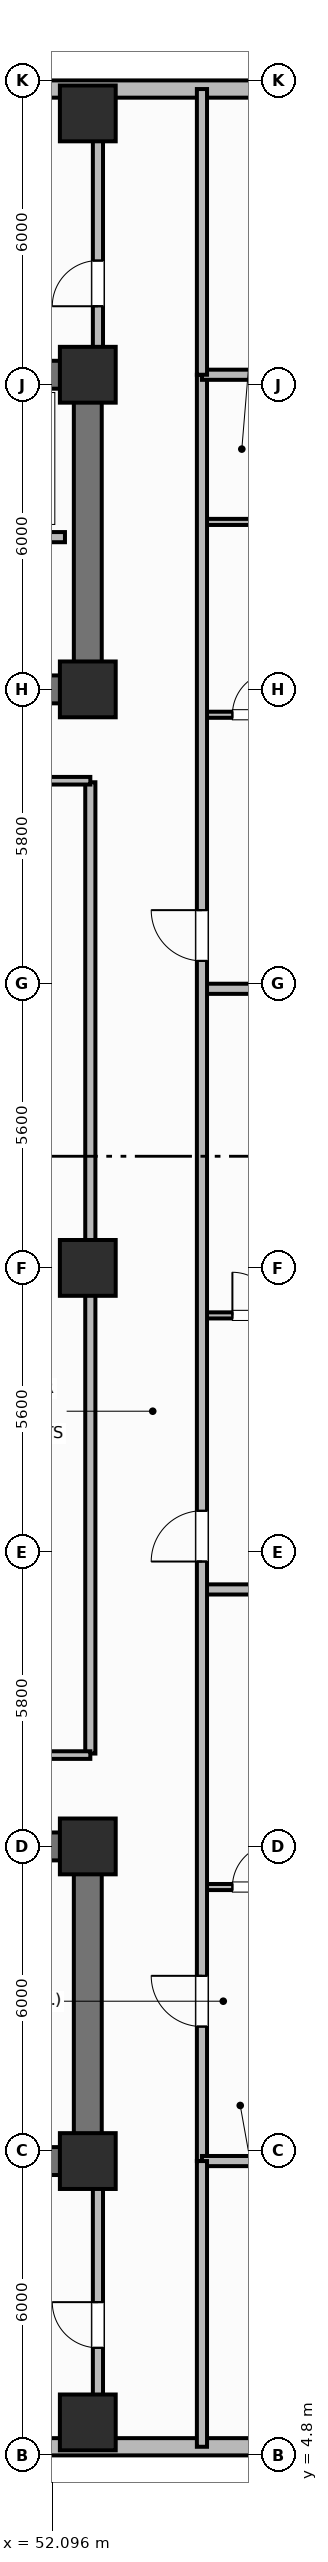
"""IFC4 building model, lengths in metres.
Left out: names, types, materials, properties, quantities, classifications, styles, units other than length and angle.
Written with IfcOpenShell. Run it as: python <this file> out.ifc"""

import sys

from ifc_helpers import new_model, si_unit, direction, frame, frame_2d, origin, origin_2d, place, context, subcontext, project, spatial, rectangle, extrude, element, fill, save


model = new_model("IFC4")
c1 = context("Model", 3, precision=1e-05, world=origin(), true_north=direction((0.0, 1.0)))
c2 = subcontext(c1, "Body", "Model", "MODEL_VIEW")
j1 = project(units=[si_unit("LENGTHUNIT", "METRE"), si_unit("PLANEANGLEUNIT", "RADIAN")], contexts=[c1])
p1 = place(None, origin())
s1 = spatial("IfcSite", under=j1, at=p1, CompositionType="ELEMENT")
p2 = place(p1, origin())
s2 = spatial("IfcBuilding", under=s1, at=p2, CompositionType="ELEMENT")
p3 = place(p2, frame((0.0, 0.0, 92.0)))
s3 = spatial("IfcBuildingStorey", under=s2, at=p3, CompositionType="ELEMENT", Elevation=92.0)
p4 = place(p3, frame((52.8, 10.6, 0.0), z_axis=(0.0, 0.0, 1.0), x_axis=(-1.0, 0.0, 0.0)))
e1 = element("IfcWall", 1, at=p4, inside=s3, PredefinedType="SHEAR", context=c2, shape_type="SweptSolid", body=[
    extrude(rectangle(XDim=27.2, YDim=0.55, at=frame_2d((13.6, 0.0))), origin(), (0.0, 0.0, 1.0), 3.7),
])
p5 = place(p3, frame((52.8, 10.875, 0.0), z_axis=(0.0, 0.0, 1.0), x_axis=(0.0, 1.0, 0.0)))
e2 = element("IfcWall", 2, at=p5, inside=s3, PredefinedType="SHEAR", context=c2, shape_type="SweptSolid", body=[
    extrude(rectangle(XDim=5.65, YDim=0.55, at=frame_2d((2.825, 0.0))), origin(), (0.0, 0.0, 1.0), 3.7),
])
p6 = place(p3, frame((25.6, 16.8, 0.0), z_axis=(0.0, 0.0, 1.0), x_axis=(1.0, 0.0, 0.0)))
e3 = element("IfcWall", 3, at=p6, inside=s3, PredefinedType="SHEAR", context=c2, shape_type="SweptSolid", body=[
    extrude(rectangle(XDim=27.2, YDim=0.55, at=frame_2d((13.6, 0.0))), origin(), (0.0, 0.0, 1.0), 3.7),
])
p7 = place(p6, frame((1.9, 0.0, 0.0)))
e4 = element("IfcOpeningElement", 4, at=p7, cuts=e3, PredefinedType="OPENING", context=c2, shape_type="SweptSolid", body=[
    extrude(rectangle(XDim=1.1, YDim=2.15, at=frame_2d((0.55, 1.075))), frame((0.0, 0.285, 0.0), z_axis=(0.0, -1.0, 0.0), x_axis=(1.0, 0.0, 0.0)), (0.0, 0.0, 1.0), 0.57),
])
p8 = place(p6, frame((13.0, 0.0, 0.0)))
e5 = element("IfcOpeningElement", 5, at=p8, cuts=e3, PredefinedType="OPENING", context=c2, shape_type="SweptSolid", body=[
    extrude(rectangle(XDim=1.2, YDim=2.15, at=frame_2d((0.6, 1.075))), frame((0.0, 0.285, 0.0), z_axis=(0.0, -1.0, 0.0), x_axis=(1.0, 0.0, 0.0)), (0.0, 0.0, 1.0), 0.57),
])
p9 = place(p6, frame((21.6, 0.0, 0.0)))
e6 = element("IfcOpeningElement", 6, at=p9, cuts=e3, PredefinedType="OPENING", context=c2, shape_type="SweptSolid", body=[
    extrude(rectangle(XDim=1.0, YDim=2.15, at=frame_2d((0.5, 1.075))), frame((0.0, 0.285, 0.0), z_axis=(0.0, -1.0, 0.0), x_axis=(1.0, 0.0, 0.0)), (0.0, 0.0, 1.0), 0.57),
])
p10 = place(p3, frame((25.6, 45.8, 0.0), z_axis=(0.0, 0.0, 1.0), x_axis=(1.0, 0.0, 0.0)))
e7 = element("IfcWall", 7, at=p10, inside=s3, PredefinedType="SHEAR", context=c2, shape_type="SweptSolid", body=[
    extrude(rectangle(XDim=27.2, YDim=0.55, at=frame_2d((13.6, 0.0))), origin(), (0.0, 0.0, 1.0), 3.7),
])
p11 = place(p3, frame((52.8, 39.875, 0.0), z_axis=(0.0, 0.0, 1.0), x_axis=(0.0, 1.0, 0.0)))
e8 = element("IfcWall", 8, at=p11, inside=s3, PredefinedType="SHEAR", context=c2, shape_type="SweptSolid", body=[
    extrude(rectangle(XDim=5.65, YDim=0.55, at=frame_2d((2.825, 0.0))), origin(), (0.0, 0.0, 1.0), 3.7),
])
p12 = place(p3, frame((52.8, 39.6, 0.0), z_axis=(0.0, 0.0, 1.0), x_axis=(-1.0, 0.0, 0.0)))
e9 = element("IfcWall", 9, at=p12, inside=s3, PredefinedType="SHEAR", context=c2, shape_type="SweptSolid", body=[
    extrude(rectangle(XDim=27.2, YDim=0.55, at=frame_2d((13.6, 0.0))), origin(), (0.0, 0.0, 1.0), 3.7),
])
p13 = place(p12, frame((24.2, 0.0, 0.0)))
e10 = element("IfcOpeningElement", 10, at=p13, cuts=e9, PredefinedType="OPENING", context=c2, shape_type="SweptSolid", body=[
    extrude(rectangle(XDim=1.1, YDim=2.15, at=frame_2d((0.55, 1.075))), frame((0.0, 0.285, 0.0), z_axis=(0.0, -1.0, 0.0), x_axis=(1.0, 0.0, 0.0)), (0.0, 0.0, 1.0), 0.57),
])
p14 = place(p12, frame((15.1, 0.0, 0.0)))
e11 = element("IfcOpeningElement", 11, at=p14, cuts=e9, PredefinedType="OPENING", context=c2, shape_type="SweptSolid", body=[
    extrude(rectangle(XDim=1.2, YDim=2.15, at=frame_2d((0.6, 1.075))), frame((0.0, 0.285, 0.0), z_axis=(0.0, -1.0, 0.0), x_axis=(1.0, 0.0, 0.0)), (0.0, 0.0, 1.0), 0.57),
])
p15 = place(p12, frame((11.3, 0.0, 0.0)))
e12 = element("IfcOpeningElement", 12, at=p15, cuts=e9, PredefinedType="OPENING", context=c2, shape_type="SweptSolid", body=[
    extrude(rectangle(XDim=1.3, YDim=2.2, at=frame_2d((0.65, 1.1))), frame((0.0, 0.285, 0.0), z_axis=(0.0, -1.0, 0.0), x_axis=(1.0, 0.0, 0.0)), (0.0, 0.0, 1.0), 0.57),
])
p16 = place(p12, frame((7.25, 0.0, 0.0)))
e13 = element("IfcOpeningElement", 13, at=p16, cuts=e9, PredefinedType="OPENING", context=c2, shape_type="SweptSolid", body=[
    extrude(rectangle(XDim=0.85, YDim=2.1, at=frame_2d((0.425, 1.05))), frame((0.0, 0.285, 0.0), z_axis=(0.0, -1.0, 0.0), x_axis=(1.0, 0.0, 0.0)), (0.0, 0.0, 1.0), 0.57),
])
p17 = place(p12, frame((3.0, 0.0, 0.0)))
e14 = element("IfcOpeningElement", 14, at=p17, cuts=e9, PredefinedType="OPENING", context=c2, shape_type="SweptSolid", body=[
    extrude(rectangle(XDim=0.9, YDim=2.1, at=frame_2d((0.45, 1.05))), frame((0.0, 0.285, 0.0), z_axis=(0.0, -1.0, 0.0), x_axis=(1.0, 0.0, 0.0)), (0.0, 0.0, 1.0), 0.57),
])
for number, where, z_axis, x_axis in (
    (15, (52.8, 10.6, 0.0), (0.0, 0.0, 1.0), (1.0, 0.0, 0.0)),
    (16, (52.8, 16.8, 0.0), (0.0, 0.0, 1.0), (1.0, 0.0, 0.0)),
    (17, (52.8, 39.6, 0.0), (0.0, 0.0, 1.0), (1.0, 0.0, 0.0)),
    (18, (52.8, 45.8, 0.0), (0.0, 0.0, 1.0), (1.0, 0.0, 0.0)),
    (19, (52.8, 28.2, 0.0), (0.0, 0.0, 1.0), (1.0, 0.0, 0.0)),
    (20, (52.8, 5.45, 0.0), (0.0, 0.0, 1.0), (1.0, 0.0, 0.0)),
    (21, (52.8, 50.95, 0.0), (0.0, 0.0, 1.0), (1.0, 0.0, 0.0)),
):
    element("IfcColumn", number, at=place(p3, frame(where, z_axis=z_axis, x_axis=x_axis)), inside=s3, PredefinedType="COLUMN", context=c2, shape_type="SweptSolid", body=[
        extrude(rectangle(XDim=1.1, YDim=1.1, at=origin_2d()), origin(), (0.0, 0.0, 1.0), 3.7),
    ])
p18 = place(p3, frame((42.4, 4.97, 0.0), z_axis=(0.0, 0.0, 1.0), x_axis=(1.0, 0.0, 0.0)))
e22 = element("IfcWall", 22, at=p18, inside=s3, PredefinedType="SOLIDWALL", context=c2, shape_type="SweptSolid", body=[
    extrude(rectangle(XDim=17.4, YDim=0.34, at=frame_2d((8.7, 0.0))), origin(), (0.0, 0.0, 1.0), 2.7),
])
p19 = place(p18, frame((2.26, 0.0, 0.73)))
e23 = element("IfcOpeningElement", 23, at=p19, cuts=e22, PredefinedType="OPENING", context=c2, shape_type="SweptSolid", body=[
    extrude(rectangle(XDim=1.4, YDim=1.85, at=frame_2d((0.7, 0.925))), frame((0.0, 0.18, 0.0), z_axis=(0.0, -1.0, 0.0), x_axis=(1.0, 0.0, 0.0)), (0.0, 0.0, 1.0), 0.36),
])
p20 = place(p18, frame((5.13, 0.0, 0.73)))
e24 = element("IfcOpeningElement", 24, at=p20, cuts=e22, PredefinedType="OPENING", context=c2, shape_type="SweptSolid", body=[
    extrude(rectangle(XDim=1.4, YDim=1.85, at=frame_2d((0.7, 0.925))), frame((0.0, 0.18, 0.0), z_axis=(0.0, -1.0, 0.0), x_axis=(1.0, 0.0, 0.0)), (0.0, 0.0, 1.0), 0.36),
])
p21 = place(p18, frame((7.65, 0.0, 0.73)))
e25 = element("IfcOpeningElement", 25, at=p21, cuts=e22, PredefinedType="OPENING", context=c2, shape_type="SweptSolid", body=[
    extrude(rectangle(XDim=1.4, YDim=1.85, at=frame_2d((0.7, 0.925))), frame((0.0, 0.18, 0.0), z_axis=(0.0, -1.0, 0.0), x_axis=(1.0, 0.0, 0.0)), (0.0, 0.0, 1.0), 0.36),
])
p22 = place(p18, frame((14.44, 0.0, 0.73)))
e26 = element("IfcOpeningElement", 26, at=p22, cuts=e22, PredefinedType="OPENING", context=c2, shape_type="SweptSolid", body=[
    extrude(rectangle(XDim=1.4, YDim=1.85, at=frame_2d((0.7, 0.925))), frame((0.0, 0.18, 0.0), z_axis=(0.0, -1.0, 0.0), x_axis=(1.0, 0.0, 0.0)), (0.0, 0.0, 1.0), 0.36),
])
p23 = place(p3, frame((59.8, 51.43, 0.0), z_axis=(0.0, 0.0, 1.0), x_axis=(-1.0, 0.0, 0.0)))
e27 = element("IfcWall", 27, at=p23, inside=s3, PredefinedType="SOLIDWALL", context=c2, shape_type="SweptSolid", body=[
    extrude(rectangle(XDim=17.4, YDim=0.34, at=frame_2d((8.7, 0.0))), origin(), (0.0, 0.0, 1.0), 2.7),
])
p24 = place(p23, frame((1.36, 0.0, 0.73)))
e28 = element("IfcOpeningElement", 28, at=p24, cuts=e27, PredefinedType="OPENING", context=c2, shape_type="SweptSolid", body=[
    extrude(rectangle(XDim=1.8, YDim=1.85, at=frame_2d((0.9, 0.925))), frame((0.0, 0.18, 0.0), z_axis=(0.0, -1.0, 0.0), x_axis=(1.0, 0.0, 0.0)), (0.0, 0.0, 1.0), 0.36),
])
p25 = place(p23, frame((8.5, 0.0, 0.73)))
e29 = element("IfcOpeningElement", 29, at=p25, cuts=e27, PredefinedType="OPENING", context=c2, shape_type="SweptSolid", body=[
    extrude(rectangle(XDim=1.8, YDim=1.85, at=frame_2d((0.9, 0.925))), frame((0.0, 0.18, 0.0), z_axis=(0.0, -1.0, 0.0), x_axis=(1.0, 0.0, 0.0)), (0.0, 0.0, 1.0), 0.36),
])
p26 = place(p23, frame((13.54, 0.0, 0.73)))
e30 = element("IfcOpeningElement", 30, at=p26, cuts=e27, PredefinedType="OPENING", context=c2, shape_type="SweptSolid", body=[
    extrude(rectangle(XDim=1.8, YDim=1.85, at=frame_2d((0.9, 0.925))), frame((0.0, 0.18, 0.0), z_axis=(0.0, -1.0, 0.0), x_axis=(1.0, 0.0, 0.0)), (0.0, 0.0, 1.0), 0.36),
])
p27 = place(p3, frame((52.35, 42.6, 0.0), z_axis=(0.0, 0.0, 1.0), x_axis=(-1.0, 0.0, 0.0)))
e31 = element("IfcWall", 31, at=p27, inside=s3, PredefinedType="PARTITIONING", context=c2, shape_type="SweptSolid", body=[
    extrude(rectangle(XDim=8.8, YDim=0.2, at=frame_2d((4.4, 0.0))), origin(), (0.0, 0.0, 1.0), 2.53),
])
p28 = place(p27, frame((7.1, 0.0, 0.0)))
e32 = element("IfcOpeningElement", 32, at=p28, cuts=e31, PredefinedType="OPENING", context=c2, shape_type="SweptSolid", body=[
    extrude(rectangle(XDim=1.0, YDim=2.15, at=frame_2d((0.5, 1.075))), frame((0.0, 0.11, 0.0), z_axis=(0.0, -1.0, 0.0), x_axis=(1.0, 0.0, 0.0)), (0.0, 0.0, 1.0), 0.22),
])
p29 = place(p3, frame((52.85, 18.63, 0.0), z_axis=(0.0, 0.0, 1.0), x_axis=(0.0, 1.0, 0.0)))
e33 = element("IfcWall", 33, at=p29, inside=s3, PredefinedType="PARTITIONING", context=c2, shape_type="SweptSolid", body=[
    extrude(rectangle(XDim=19.14, YDim=0.2, at=frame_2d((9.57, 0.0))), origin(), (0.0, 0.0, 1.0), 2.53),
])
for number, where, z_axis, x_axis in (
    (34, (46.35, 18.6, 0.0), (0.0, 0.0, 1.0), (1.0, 0.0, 0.0)),
    (35, (46.35, 37.8, 0.0), (0.0, 0.0, 1.0), (1.0, 0.0, 0.0)),
):
    element("IfcWall", number, at=place(p3, frame(where, z_axis=z_axis, x_axis=x_axis)), inside=s3, PredefinedType="PARTITIONING", context=c2, shape_type="SweptSolid", body=[
        extrude(rectangle(XDim=6.5, YDim=0.15, at=frame_2d((3.25, 0.0))), origin(), (0.0, 0.0, 1.0), 2.53),
    ])
p30 = place(p3, frame((55.05, 16.0, 0.0), z_axis=(0.0, 0.0, 1.0), x_axis=(1.0, 0.0, 0.0)))
e36 = element("IfcWall", 36, at=p30, inside=s3, PredefinedType="PARTITIONING", context=c2, shape_type="SweptSolid", body=[
    extrude(rectangle(XDim=2.25, YDim=0.12, at=frame_2d((1.125, 0.0))), origin(), (0.0, 0.0, 1.0), 2.53),
])
p31 = place(p30, frame((0.6, 0.0, 0.0)))
e37 = element("IfcOpeningElement", 37, at=p31, cuts=e36, PredefinedType="OPENING", context=c2, shape_type="SweptSolid", body=[
    extrude(rectangle(XDim=0.85, YDim=2.1, at=frame_2d((0.425, 1.05))), frame((0.0, 0.07, 0.0), z_axis=(0.0, -1.0, 0.0), x_axis=(1.0, 0.0, 0.0)), (0.0, 0.0, 1.0), 0.14),
])
p32 = place(p3, frame((55.05, 21.864, 0.0), z_axis=(0.0, 0.0, 1.0), x_axis=(1.0, 0.0, 0.0)))
e38 = element("IfcWall", 38, at=p32, inside=s3, PredefinedType="PARTITIONING", context=c2, shape_type="SweptSolid", body=[
    extrude(rectangle(XDim=8.78, YDim=0.2, at=frame_2d((4.39, 0.0))), origin(), (0.0, 0.0, 1.0), 2.53),
])
p33 = place(p3, frame((55.05, 27.264, 0.0), z_axis=(0.0, 0.0, 1.0), x_axis=(1.0, 0.0, 0.0)))
e39 = element("IfcWall", 39, at=p33, inside=s3, PredefinedType="PARTITIONING", context=c2, shape_type="SweptSolid", body=[
    extrude(rectangle(XDim=2.25, YDim=0.12, at=frame_2d((1.125, 0.0))), origin(), (0.0, 0.0, 1.0), 2.53),
])
p34 = place(p33, frame((0.6, 0.0, 0.0)))
e40 = element("IfcOpeningElement", 40, at=p34, cuts=e39, PredefinedType="OPENING", context=c2, shape_type="SweptSolid", body=[
    extrude(rectangle(XDim=0.85, YDim=2.1, at=frame_2d((0.425, 1.05))), frame((0.0, 0.07, 0.0), z_axis=(0.0, -1.0, 0.0), x_axis=(1.0, 0.0, 0.0)), (0.0, 0.0, 1.0), 0.14),
])
p35 = place(p3, frame((55.05, 33.7, 0.0), z_axis=(0.0, 0.0, 1.0), x_axis=(1.0, 0.0, 0.0)))
e41 = element("IfcWall", 41, at=p35, inside=s3, PredefinedType="PARTITIONING", context=c2, shape_type="SweptSolid", body=[
    extrude(rectangle(XDim=8.78, YDim=0.2, at=frame_2d((4.39, 0.0))), origin(), (0.0, 0.0, 1.0), 2.53),
])
p36 = place(p3, frame((55.05, 39.1, 0.0), z_axis=(0.0, 0.0, 1.0), x_axis=(1.0, 0.0, 0.0)))
e42 = element("IfcWall", 42, at=p36, inside=s3, PredefinedType="PARTITIONING", context=c2, shape_type="SweptSolid", body=[
    extrude(rectangle(XDim=2.25, YDim=0.12, at=frame_2d((1.125, 0.0))), origin(), (0.0, 0.0, 1.0), 2.53),
])
p37 = place(p36, frame((0.6, 0.0, 0.0)))
e43 = element("IfcOpeningElement", 43, at=p37, cuts=e42, PredefinedType="OPENING", context=c2, shape_type="SweptSolid", body=[
    extrude(rectangle(XDim=0.85, YDim=2.1, at=frame_2d((0.425, 1.05))), frame((0.0, 0.07, 0.0), z_axis=(0.0, -1.0, 0.0), x_axis=(1.0, 0.0, 0.0)), (0.0, 0.0, 1.0), 0.14),
])
p38 = place(p3, frame((55.05, 42.9, 0.0), z_axis=(0.0, 0.0, 1.0), x_axis=(1.0, 0.0, 0.0)))
e44 = element("IfcWall", 44, at=p38, inside=s3, PredefinedType="PARTITIONING", context=c2, shape_type="SweptSolid", body=[
    extrude(rectangle(XDim=2.25, YDim=0.12, at=frame_2d((1.125, 0.0))), origin(), (0.0, 0.0, 1.0), 2.53),
])
p39 = place(p3, frame((55.05, 10.6, 0.0), z_axis=(0.0, 0.0, 1.0), x_axis=(0.0, 1.0, 0.0)))
e45 = element("IfcWall", 45, at=p39, inside=s3, PredefinedType="PARTITIONING", context=c2, shape_type="SweptSolid", body=[
    extrude(rectangle(XDim=35.2, YDim=0.2, at=frame_2d((17.6, 0.0))), origin(), (0.0, 0.0, 1.0), 2.53),
])
p40 = place(p39, frame((2.65, 0.0, 0.0)))
e46 = element("IfcOpeningElement", 46, at=p40, cuts=e45, PredefinedType="OPENING", context=c2, shape_type="SweptSolid", body=[
    extrude(rectangle(XDim=1.0, YDim=2.15, at=frame_2d((0.5, 1.075))), frame((0.0, 0.11, 0.0), z_axis=(0.0, -1.0, 0.0), x_axis=(1.0, 0.0, 0.0)), (0.0, 0.0, 1.0), 0.22),
])
p41 = place(p39, frame((11.814, 0.0, 0.0)))
e47 = element("IfcOpeningElement", 47, at=p41, cuts=e45, PredefinedType="OPENING", context=c2, shape_type="SweptSolid", body=[
    extrude(rectangle(XDim=1.0, YDim=2.15, at=frame_2d((0.5, 1.075))), frame((0.0, 0.11, 0.0), z_axis=(0.0, -1.0, 0.0), x_axis=(1.0, 0.0, 0.0)), (0.0, 0.0, 1.0), 0.22),
])
p42 = place(p39, frame((23.65, 0.0, 0.0)))
e48 = element("IfcOpeningElement", 48, at=p42, cuts=e45, PredefinedType="OPENING", context=c2, shape_type="SweptSolid", body=[
    extrude(rectangle(XDim=1.0, YDim=2.15, at=frame_2d((0.5, 1.075))), frame((0.0, 0.11, 0.0), z_axis=(0.0, -1.0, 0.0), x_axis=(1.0, 0.0, 0.0)), (0.0, 0.0, 1.0), 0.22),
])
for number, where, z_axis, x_axis in (
    (49, (55.05, 10.6, 0.0), (0.0, 0.0, 1.0), (1.0, 0.0, 0.0)),
    (50, (55.05, 45.8, 0.0), (0.0, 0.0, 1.0), (1.0, 0.0, 0.0)),
):
    element("IfcWall", number, at=place(p3, frame(where, z_axis=z_axis, x_axis=x_axis)), inside=s3, PredefinedType="PARTITIONING", context=c2, shape_type="SweptSolid", body=[
        extrude(rectangle(XDim=8.36, YDim=0.2, at=frame_2d((4.18, 0.0))), origin(), (0.0, 0.0, 1.0), 2.53),
    ])
p43 = place(p3, frame((55.05, 4.97, 0.0), z_axis=(0.0, 0.0, 1.0), x_axis=(0.0, 1.0, 0.0)))
e51 = element("IfcWall", 51, at=p43, inside=s3, PredefinedType="PARTITIONING", context=c2, shape_type="SweptSolid", body=[
    extrude(rectangle(XDim=5.63, YDim=0.2, at=frame_2d((2.815, 0.0))), origin(), (0.0, 0.0, 1.0), 2.53),
])
p44 = place(p3, frame((55.05, 45.8, 0.0), z_axis=(0.0, 0.0, 1.0), x_axis=(0.0, 1.0, 0.0)))
e52 = element("IfcWall", 52, at=p44, inside=s3, PredefinedType="PARTITIONING", context=c2, shape_type="SweptSolid", body=[
    extrude(rectangle(XDim=5.63, YDim=0.2, at=frame_2d((2.815, 0.0))), origin(), (0.0, 0.0, 1.0), 2.53),
])
p45 = place(p3, frame((53.0, 5.62, 0.0), z_axis=(0.0, 0.0, 1.0), x_axis=(0.0, 1.0, 0.0)))
e53 = element("IfcWall", 53, at=p45, inside=s3, PredefinedType="PARTITIONING", context=c2, shape_type="SweptSolid", body=[
    extrude(rectangle(XDim=4.68, YDim=0.2, at=frame_2d((2.34, 0.0))), origin(), (0.0, 0.0, 1.0), 2.53),
])
p46 = place(p45, frame((1.3, 0.0, 0.0)))
e54 = element("IfcOpeningElement", 54, at=p46, cuts=e53, PredefinedType="OPENING", context=c2, shape_type="SweptSolid", body=[
    extrude(rectangle(XDim=0.9, YDim=2.1, at=frame_2d((0.45, 1.05))), frame((0.0, 0.11, 0.0), z_axis=(0.0, -1.0, 0.0), x_axis=(1.0, 0.0, 0.0)), (0.0, 0.0, 1.0), 0.22),
])
p47 = place(p3, frame((53.0, 46.1, 0.0), z_axis=(0.0, 0.0, 1.0), x_axis=(0.0, 1.0, 0.0)))
e55 = element("IfcWall", 55, at=p47, inside=s3, PredefinedType="PARTITIONING", context=c2, shape_type="SweptSolid", body=[
    extrude(rectangle(XDim=4.68, YDim=0.2, at=frame_2d((2.34, 0.0))), origin(), (0.0, 0.0, 1.0), 2.53),
])
p48 = place(p47, frame((1.05, 0.0, 0.0)))
e56 = element("IfcOpeningElement", 56, at=p48, cuts=e55, PredefinedType="OPENING", context=c2, shape_type="SweptSolid", body=[
    extrude(rectangle(XDim=0.9, YDim=2.1, at=frame_2d((0.45, 1.05))), frame((0.0, 0.11, 0.0), z_axis=(0.0, -1.0, 0.0), x_axis=(1.0, 0.0, 0.0)), (0.0, 0.0, 1.0), 0.22),
])
p49 = place(p31, origin())
e57 = element("IfcDoor", 57, at=p49, inside=s3, OperationType="SINGLE_SWING_RIGHT", PredefinedType="DOOR", context=c2, shape_type="SweptSolid", body=[
    extrude(rectangle(XDim=0.85, YDim=2.1, at=frame_2d((0.425, 1.05))), frame((0.0, 0.025, 0.0), z_axis=(0.0, -1.0, 0.0), x_axis=(1.0, 0.0, 0.0)), (0.0, 0.0, 1.0), 0.05),
])
fill(e37, e57)
p50 = place(p34, origin())
e58 = element("IfcDoor", 58, at=p50, inside=s3, OperationType="SINGLE_SWING_LEFT", PredefinedType="DOOR", context=c2, shape_type="SweptSolid", body=[
    extrude(rectangle(XDim=0.85, YDim=2.1, at=frame_2d((0.425, 1.05))), frame((0.0, 0.025, 0.0), z_axis=(0.0, -1.0, 0.0), x_axis=(1.0, 0.0, 0.0)), (0.0, 0.0, 1.0), 0.05),
])
fill(e40, e58)
p51 = place(p37, origin())
e59 = element("IfcDoor", 59, at=p51, inside=s3, OperationType="SINGLE_SWING_RIGHT", PredefinedType="DOOR", context=c2, shape_type="SweptSolid", body=[
    extrude(rectangle(XDim=0.85, YDim=2.1, at=frame_2d((0.425, 1.05))), frame((0.0, 0.025, 0.0), z_axis=(0.0, -1.0, 0.0), x_axis=(1.0, 0.0, 0.0)), (0.0, 0.0, 1.0), 0.05),
])
fill(e43, e59)
p52 = place(p40, origin())
e60 = element("IfcDoor", 60, at=p52, inside=s3, OperationType="SINGLE_SWING_RIGHT", PredefinedType="DOOR", context=c2, shape_type="SweptSolid", body=[
    extrude(rectangle(XDim=1.0, YDim=2.15, at=frame_2d((0.5, 1.075))), frame((0.0, 0.025, 0.0), z_axis=(0.0, -1.0, 0.0), x_axis=(1.0, 0.0, 0.0)), (0.0, 0.0, 1.0), 0.05),
])
fill(e46, e60)
p53 = place(p41, origin())
e61 = element("IfcDoor", 61, at=p53, inside=s3, OperationType="SINGLE_SWING_LEFT", PredefinedType="DOOR", context=c2, shape_type="SweptSolid", body=[
    extrude(rectangle(XDim=1.0, YDim=2.15, at=frame_2d((0.5, 1.075))), frame((0.0, 0.025, 0.0), z_axis=(0.0, -1.0, 0.0), x_axis=(1.0, 0.0, 0.0)), (0.0, 0.0, 1.0), 0.05),
])
fill(e47, e61)
p54 = place(p42, origin())
e62 = element("IfcDoor", 62, at=p54, inside=s3, OperationType="SINGLE_SWING_RIGHT", PredefinedType="DOOR", context=c2, shape_type="SweptSolid", body=[
    extrude(rectangle(XDim=1.0, YDim=2.15, at=frame_2d((0.5, 1.075))), frame((0.0, 0.025, 0.0), z_axis=(0.0, -1.0, 0.0), x_axis=(1.0, 0.0, 0.0)), (0.0, 0.0, 1.0), 0.05),
])
fill(e48, e62)
p55 = place(p46, origin())
e63 = element("IfcDoor", 63, at=p55, inside=s3, OperationType="SINGLE_SWING_RIGHT", PredefinedType="DOOR", context=c2, shape_type="SweptSolid", body=[
    extrude(rectangle(XDim=0.9, YDim=2.1, at=frame_2d((0.45, 1.05))), frame((0.0, 0.025, 0.0), z_axis=(0.0, -1.0, 0.0), x_axis=(1.0, 0.0, 0.0)), (0.0, 0.0, 1.0), 0.05),
])
fill(e54, e63)
p56 = place(p48, origin())
e64 = element("IfcDoor", 64, at=p56, inside=s3, OperationType="SINGLE_SWING_LEFT", PredefinedType="DOOR", context=c2, shape_type="SweptSolid", body=[
    extrude(rectangle(XDim=0.9, YDim=2.1, at=frame_2d((0.45, 1.05))), frame((0.0, 0.025, 0.0), z_axis=(0.0, -1.0, 0.0), x_axis=(1.0, 0.0, 0.0)), (0.0, 0.0, 1.0), 0.05),
])
fill(e56, e64)
save(model, sys.argv[1])
